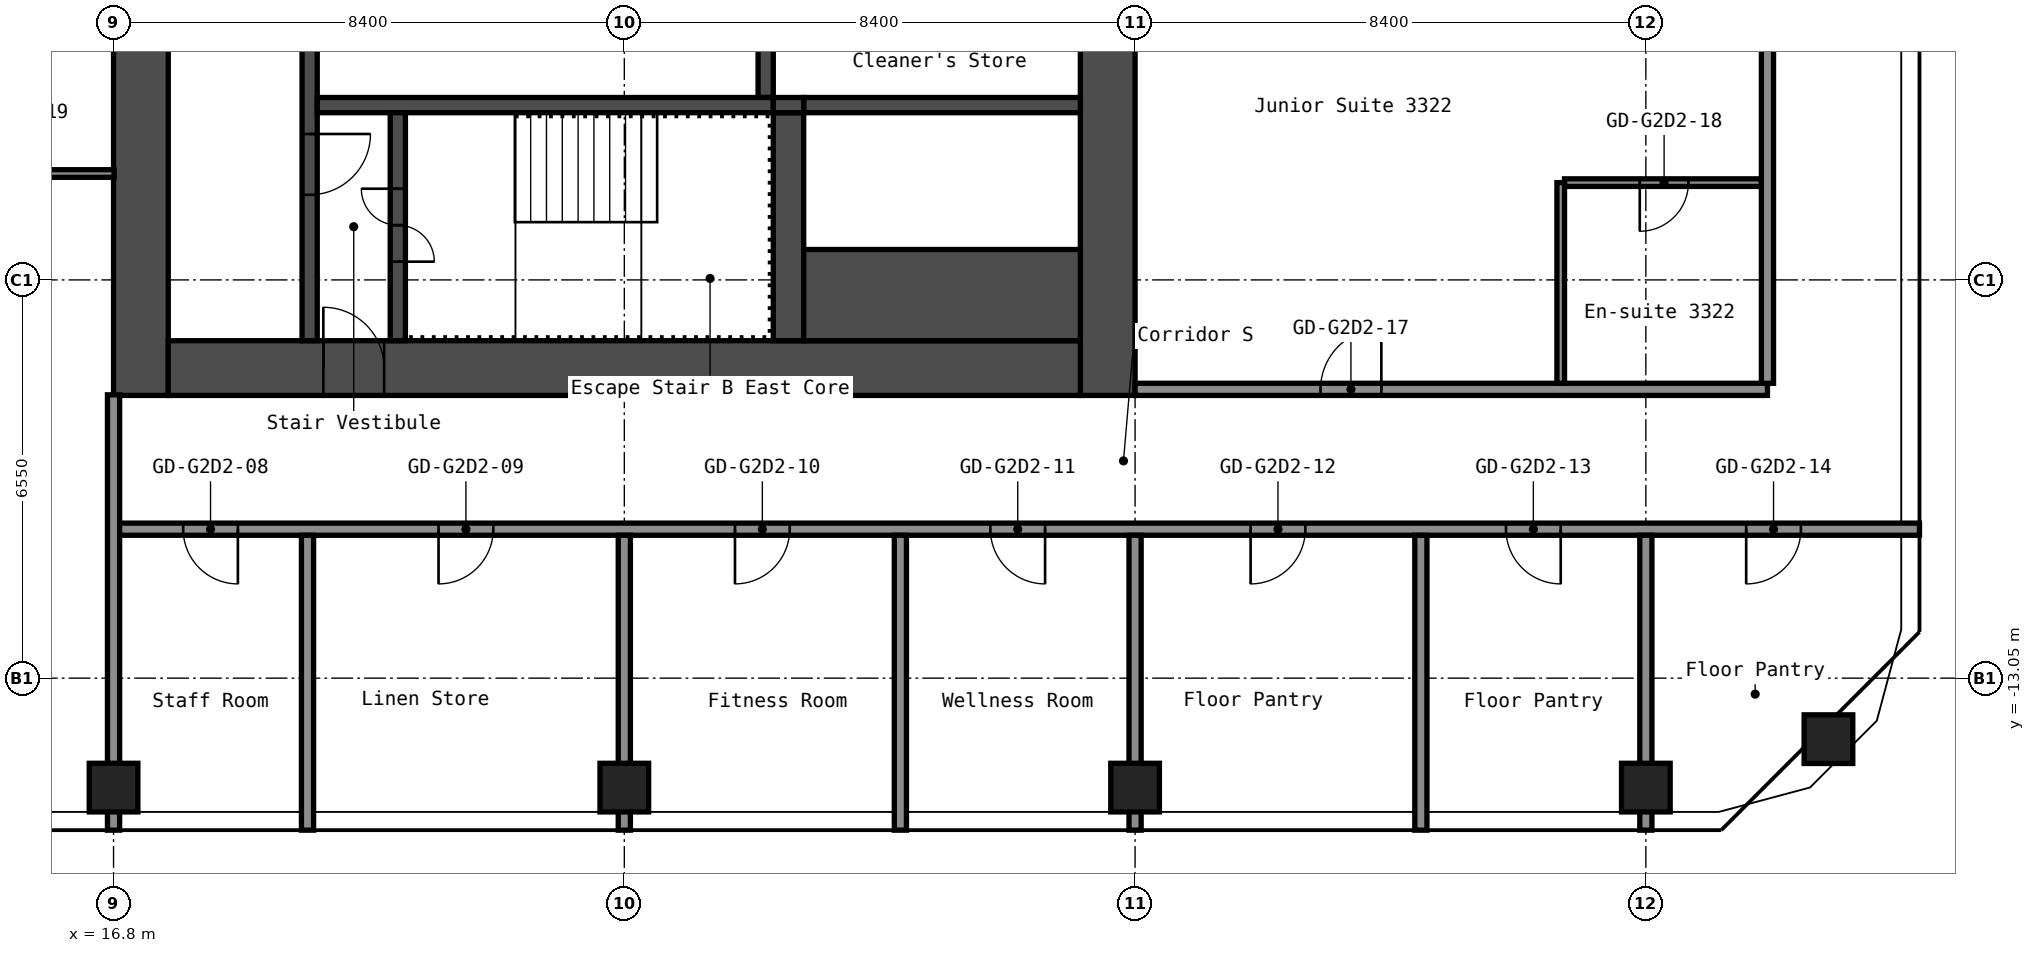
"""IFC4 building model, lengths in metres.
Left out: names, types, materials, properties, quantities, classifications, styles, units other than length and angle.
Written with IfcOpenShell. Run it as: python <this file> out.ifc"""

import sys

from ifc_helpers import new_model, si_unit, direction, frame, frame_2d, origin, origin_2d, place, context, subcontext, project, spatial, rectangle, hollow_rectangle, extrude, element, fill, save


model = new_model("IFC4")
c1 = context("Model", 3, precision=1e-05, world=origin(), true_north=direction((0.0, 1.0)))
c2 = subcontext(c1, "Body", "Model", "MODEL_VIEW")
j1 = project(units=[si_unit("LENGTHUNIT", "METRE"), si_unit("PLANEANGLEUNIT", "RADIAN")], contexts=[c1])
p1 = place(None, origin())
s1 = spatial("IfcSite", under=j1, at=p1, CompositionType="ELEMENT")
p2 = place(p1, origin())
s2 = spatial("IfcBuilding", under=s1, at=p2, CompositionType="ELEMENT")
p3 = place(p2, frame((0.0, 0.0, 117.0)))
s3 = spatial("IfcBuildingStorey", under=s2, at=p3, CompositionType="ELEMENT", Elevation=117.0)
for number, where, z_axis, x_axis in (
    (1, (16.8, -14.85, 0.0), (0.0, 0.0, 1.0), (1.0, 0.0, 0.0)),
    (2, (25.2, -14.85, 0.0), (0.0, 0.0, 1.0), (1.0, 0.0, 0.0)),
    (3, (33.6, -14.85, 0.0), (0.0, 0.0, 1.0), (1.0, 0.0, 0.0)),
    (4, (42.0, -14.85, 0.0), (0.0, 0.0, 1.0), (1.0, 0.0, 0.0)),
    (5, (45.003, -14.053, 0.0), (0.0, 0.0, 1.0), (1.0, 0.0, 0.0)),
):
    element("IfcColumn", number, at=place(p3, frame(where, z_axis=z_axis, x_axis=x_axis)), inside=s3, PredefinedType="COLUMN", context=c2, shape_type="SweptSolid", body=[
        extrude(hollow_rectangle(XDim=0.8, YDim=0.8, WallThickness=0.032, at=origin_2d()), origin(), (0.0, 0.0, 1.0), 2.9),
    ])
p4 = place(p3, frame((17.25, -8.4, 0.0), z_axis=(0.0, 0.0, 1.0), x_axis=(0.0, 1.0, 0.0)))
e6 = element("IfcWall", 6, at=p4, inside=s3, PredefinedType="SHEAR", context=c2, shape_type="SweptSolid", body=[
    extrude(rectangle(XDim=16.8, YDim=0.9, at=frame_2d((8.4, 0.0))), origin(), (0.0, 0.0, 1.0), 2.9),
])
p5 = place(p4, frame((7.6, 0.0, 0.0)))
e7 = element("IfcOpeningElement", 7, at=p5, cuts=e6, PredefinedType="OPENING", context=c2, shape_type="SweptSolid", body=[
    extrude(rectangle(XDim=1.2, YDim=2.1, at=frame_2d((0.6, 1.05))), frame((0.0, 0.46, 0.0), z_axis=(0.0, -1.0, 0.0), x_axis=(1.0, 0.0, 0.0)), (0.0, 0.0, 1.0), 0.92),
])
p6 = place(p3, frame((33.15, -8.4, 0.0), z_axis=(0.0, 0.0, 1.0), x_axis=(0.0, 1.0, 0.0)))
e8 = element("IfcWall", 8, at=p6, inside=s3, PredefinedType="SHEAR", context=c2, shape_type="SweptSolid", body=[
    extrude(rectangle(XDim=16.8, YDim=0.9, at=frame_2d((8.4, 0.0))), origin(), (0.0, 0.0, 1.0), 2.9),
])
p7 = place(p3, frame((17.7, -7.95, 0.0), z_axis=(0.0, 0.0, 1.0), x_axis=(1.0, 0.0, 0.0)))
e9 = element("IfcWall", 9, at=p7, inside=s3, PredefinedType="SHEAR", context=c2, shape_type="SweptSolid", body=[
    extrude(rectangle(XDim=15.0, YDim=0.9, at=frame_2d((7.5, 0.0))), origin(), (0.0, 0.0, 1.0), 2.9),
])
p8 = place(p7, frame((2.55, 0.0, 0.0)))
e10 = element("IfcOpeningElement", 10, at=p8, cuts=e9, PredefinedType="OPENING", context=c2, shape_type="SweptSolid", body=[
    extrude(rectangle(XDim=1.0, YDim=2.1, at=frame_2d((0.5, 1.05))), frame((0.0, 0.46, 0.0), z_axis=(0.0, -1.0, 0.0), x_axis=(1.0, 0.0, 0.0)), (0.0, 0.0, 1.0), 0.92),
])
p9 = place(p3, frame((20.025, -7.5, 0.0), z_axis=(0.0, 0.0, 1.0), x_axis=(0.0, 1.0, 0.0)))
e11 = element("IfcWall", 11, at=p9, inside=s3, PredefinedType="SHEAR", context=c2, shape_type="SweptSolid", body=[
    extrude(rectangle(XDim=6.3, YDim=0.25, at=frame_2d((3.15, 0.0))), origin(), (0.0, 0.0, 1.0), 2.9),
])
p10 = place(p9, frame((2.4, 0.0, 0.0)))
e12 = element("IfcOpeningElement", 12, at=p10, cuts=e11, PredefinedType="OPENING", context=c2, shape_type="SweptSolid", body=[
    extrude(rectangle(XDim=1.0, YDim=2.1, at=frame_2d((0.5, 1.05))), frame((0.0, 0.135, 0.0), z_axis=(0.0, -1.0, 0.0), x_axis=(1.0, 0.0, 0.0)), (0.0, 0.0, 1.0), 0.27),
])
p11 = place(p3, frame((27.525, -3.5, 0.0), z_axis=(0.0, 0.0, 1.0), x_axis=(0.0, 1.0, 0.0)))
e13 = element("IfcWall", 13, at=p11, inside=s3, PredefinedType="SHEAR", context=c2, shape_type="SweptSolid", body=[
    extrude(rectangle(XDim=2.05, YDim=0.25, at=frame_2d((1.025, 0.0))), origin(), (0.0, 0.0, 1.0), 2.9),
])
p12 = place(p3, frame((20.15, -3.625, 0.0), z_axis=(0.0, 0.0, 1.0), x_axis=(1.0, 0.0, 0.0)))
e14 = element("IfcWall", 14, at=p12, inside=s3, PredefinedType="SHEAR", context=c2, shape_type="SweptSolid", body=[
    extrude(rectangle(XDim=7.5, YDim=0.25, at=frame_2d((3.75, 0.0))), origin(), (0.0, 0.0, 1.0), 2.9),
])
p13 = place(p3, frame((21.475, -7.5, 0.0), z_axis=(0.0, 0.0, 1.0), x_axis=(0.0, 1.0, 0.0)))
e15 = element("IfcWall", 15, at=p13, inside=s3, PredefinedType="SHEAR", context=c2, shape_type="SweptSolid", body=[
    extrude(rectangle(XDim=3.75, YDim=0.25, at=frame_2d((1.875, 0.0))), origin(), (0.0, 0.0, 1.0), 2.9),
])
p14 = place(p13, frame((1.3, 0.0, 0.0)))
e16 = element("IfcOpeningElement", 16, at=p14, cuts=e15, PredefinedType="OPENING", context=c2, shape_type="SweptSolid", body=[
    extrude(rectangle(XDim=1.2, YDim=2.1, at=frame_2d((0.6, 1.05))), frame((0.0, 0.135, 0.0), z_axis=(0.0, -1.0, 0.0), x_axis=(1.0, 0.0, 0.0)), (0.0, 0.0, 1.0), 0.27),
])
p15 = place(p3, frame((27.9, -7.5, 0.0), z_axis=(0.0, 0.0, 1.0), x_axis=(0.0, 1.0, 0.0)))
e17 = element("IfcWall", 17, at=p15, inside=s3, PredefinedType="SHEAR", context=c2, shape_type="SweptSolid", body=[
    extrude(rectangle(XDim=3.75, YDim=0.5, at=frame_2d((1.875, 0.0))), origin(), (0.0, 0.0, 1.0), 2.9),
])
p16 = place(p3, frame((28.15, -3.625, 0.0), z_axis=(0.0, 0.0, 1.0), x_axis=(1.0, 0.0, 0.0)))
e18 = element("IfcWall", 18, at=p16, inside=s3, PredefinedType="SHEAR", context=c2, shape_type="SweptSolid", body=[
    extrude(rectangle(XDim=4.55, YDim=0.25, at=frame_2d((2.275, 0.0))), origin(), (0.0, 0.0, 1.0), 2.9),
])
p17 = place(p3, frame((28.15, -6.75, 0.0), z_axis=(0.0, 0.0, 1.0), x_axis=(1.0, 0.0, 0.0)))
e19 = element("IfcWall", 19, at=p17, inside=s3, PredefinedType="SHEAR", context=c2, shape_type="SweptSolid", body=[
    extrude(rectangle(XDim=4.55, YDim=1.5, at=frame_2d((2.275, 0.0))), origin(), (0.0, 0.0, 1.0), 2.9),
])
p18 = place(p3, frame((27.65, -3.625, 0.0), z_axis=(0.0, 0.0, 1.0), x_axis=(1.0, 0.0, 0.0)))
e20 = element("IfcWall", 20, at=p18, inside=s3, PredefinedType="SHEAR", context=c2, shape_type="SweptSolid", body=[
    extrude(rectangle(XDim=0.5, YDim=0.25, at=frame_2d((0.25, 0.0))), origin(), (0.0, 0.0, 1.0), 2.9),
])
p19 = place(p3, frame((16.8, -10.6, 0.0), z_axis=(0.0, 0.0, 1.0), x_axis=(1.0, 0.0, 0.0)))
e21 = element("IfcWall", 21, at=p19, inside=s3, PredefinedType="PARTITIONING", context=c2, shape_type="SweptSolid", body=[
    extrude(rectangle(XDim=29.7, YDim=0.2, at=frame_2d((14.85, 0.0))), origin(), (0.0, 0.0, 1.0), 2.9),
])
p20 = place(p19, frame((1.145, 0.0, 0.0)))
e22 = element("IfcOpeningElement", 22, at=p20, cuts=e21, PredefinedType="OPENING", context=c2, shape_type="SweptSolid", body=[
    extrude(rectangle(XDim=0.9, YDim=2.1, at=frame_2d((0.45, 1.05))), frame((0.0, 0.11, 0.0), z_axis=(0.0, -1.0, 0.0), x_axis=(1.0, 0.0, 0.0)), (0.0, 0.0, 1.0), 0.22),
])
p21 = place(p19, frame((5.345, 0.0, 0.0)))
e23 = element("IfcOpeningElement", 23, at=p21, cuts=e21, PredefinedType="OPENING", context=c2, shape_type="SweptSolid", body=[
    extrude(rectangle(XDim=0.9, YDim=2.1, at=frame_2d((0.45, 1.05))), frame((0.0, 0.11, 0.0), z_axis=(0.0, -1.0, 0.0), x_axis=(1.0, 0.0, 0.0)), (0.0, 0.0, 1.0), 0.22),
])
p22 = place(p19, frame((10.22, 0.0, 0.0)))
e24 = element("IfcOpeningElement", 24, at=p22, cuts=e21, PredefinedType="OPENING", context=c2, shape_type="SweptSolid", body=[
    extrude(rectangle(XDim=0.9, YDim=2.1, at=frame_2d((0.45, 1.05))), frame((0.0, 0.11, 0.0), z_axis=(0.0, -1.0, 0.0), x_axis=(1.0, 0.0, 0.0)), (0.0, 0.0, 1.0), 0.22),
])
p23 = place(p19, frame((14.42, 0.0, 0.0)))
e25 = element("IfcOpeningElement", 25, at=p23, cuts=e21, PredefinedType="OPENING", context=c2, shape_type="SweptSolid", body=[
    extrude(rectangle(XDim=0.9, YDim=2.1, at=frame_2d((0.45, 1.05))), frame((0.0, 0.11, 0.0), z_axis=(0.0, -1.0, 0.0), x_axis=(1.0, 0.0, 0.0)), (0.0, 0.0, 1.0), 0.22),
])
p24 = place(p19, frame((18.7, 0.0, 0.0)))
e26 = element("IfcOpeningElement", 26, at=p24, cuts=e21, PredefinedType="OPENING", context=c2, shape_type="SweptSolid", body=[
    extrude(rectangle(XDim=0.9, YDim=2.1, at=frame_2d((0.45, 1.05))), frame((0.0, 0.11, 0.0), z_axis=(0.0, -1.0, 0.0), x_axis=(1.0, 0.0, 0.0)), (0.0, 0.0, 1.0), 0.22),
])
p25 = place(p19, frame((22.9, 0.0, 0.0)))
e27 = element("IfcOpeningElement", 27, at=p25, cuts=e21, PredefinedType="OPENING", context=c2, shape_type="SweptSolid", body=[
    extrude(rectangle(XDim=0.9, YDim=2.1, at=frame_2d((0.45, 1.05))), frame((0.0, 0.11, 0.0), z_axis=(0.0, -1.0, 0.0), x_axis=(1.0, 0.0, 0.0)), (0.0, 0.0, 1.0), 0.22),
])
p26 = place(p19, frame((26.85, 0.0, 0.0)))
e28 = element("IfcOpeningElement", 28, at=p26, cuts=e21, PredefinedType="OPENING", context=c2, shape_type="SweptSolid", body=[
    extrude(rectangle(XDim=0.9, YDim=2.1, at=frame_2d((0.45, 1.05))), frame((0.0, 0.11, 0.0), z_axis=(0.0, -1.0, 0.0), x_axis=(1.0, 0.0, 0.0)), (0.0, 0.0, 1.0), 0.22),
])
p27 = place(p3, frame((33.6, -8.3, 0.0), z_axis=(0.0, 0.0, 1.0), x_axis=(1.0, 0.0, 0.0)))
e29 = element("IfcWall", 29, at=p27, inside=s3, PredefinedType="PARTITIONING", context=c2, shape_type="SweptSolid", body=[
    extrude(rectangle(XDim=10.4, YDim=0.2, at=frame_2d((5.2, 0.0))), origin(), (0.0, 0.0, 1.0), 2.9),
])
p28 = place(p27, frame((3.05, 0.0, 0.0)))
e30 = element("IfcOpeningElement", 30, at=p28, cuts=e29, PredefinedType="OPENING", context=c2, shape_type="SweptSolid", body=[
    extrude(rectangle(XDim=1.0, YDim=2.1, at=frame_2d((0.5, 1.05))), frame((0.0, 0.11, 0.0), z_axis=(0.0, -1.0, 0.0), x_axis=(1.0, 0.0, 0.0)), (0.0, 0.0, 1.0), 0.22),
])
p29 = place(p3, frame((40.663, -4.9, 0.0), z_axis=(0.0, 0.0, 1.0), x_axis=(1.0, 0.0, 0.0)))
e31 = element("IfcWall", 31, at=p29, inside=s3, PredefinedType="PARTITIONING", context=c2, shape_type="SweptSolid", body=[
    extrude(rectangle(XDim=3.237, YDim=0.125, at=frame_2d((1.619, 0.0))), origin(), (0.0, 0.0, 1.0), 2.9),
])
p30 = place(p29, frame((1.238, 0.0, 0.0)))
e32 = element("IfcOpeningElement", 32, at=p30, cuts=e31, PredefinedType="OPENING", context=c2, shape_type="SweptSolid", body=[
    extrude(rectangle(XDim=0.8, YDim=2.1, at=frame_2d((0.4, 1.05))), frame((0.0, 0.073, 0.0), z_axis=(0.0, -1.0, 0.0), x_axis=(1.0, 0.0, 0.0)), (0.0, 0.0, 1.0), 0.145),
])
p31 = place(p3, frame((13.462, -4.75, 0.0), z_axis=(0.0, 0.0, 1.0), x_axis=(1.0, 0.0, 0.0)))
e33 = element("IfcWall", 33, at=p31, inside=s3, PredefinedType="PARTITIONING", context=c2, shape_type="SweptSolid", body=[
    extrude(rectangle(XDim=3.348, YDim=0.125, at=frame_2d((1.674, 0.0))), origin(), (0.0, 0.0, 1.0), 2.9),
])
p32 = place(p31, frame((1.238, 0.0, 0.0)))
e34 = element("IfcOpeningElement", 34, at=p32, cuts=e33, PredefinedType="OPENING", context=c2, shape_type="SweptSolid", body=[
    extrude(rectangle(XDim=0.8, YDim=2.1, at=frame_2d((0.4, 1.05))), frame((0.0, 0.073, 0.0), z_axis=(0.0, -1.0, 0.0), x_axis=(1.0, 0.0, 0.0)), (0.0, 0.0, 1.0), 0.145),
])
p33 = place(p3, frame((16.8, -15.55, 0.0), z_axis=(0.0, 0.0, 1.0), x_axis=(0.0, 1.0, 0.0)))
e35 = element("IfcWall", 35, at=p33, inside=s3, PredefinedType="PARTITIONING", context=c2, shape_type="SweptSolid", body=[
    extrude(rectangle(XDim=7.16, YDim=0.2, at=frame_2d((3.58, 0.0))), origin(), (0.0, 0.0, 1.0), 2.9),
])
for number, where, z_axis, x_axis in (
    (36, (19.99, -15.55, 0.0), (0.0, 0.0, 1.0), (0.0, 1.0, 0.0)),
    (37, (25.2, -15.55, 0.0), (0.0, 0.0, 1.0), (0.0, 1.0, 0.0)),
    (38, (29.74, -15.55, 0.0), (0.0, 0.0, 1.0), (0.0, 1.0, 0.0)),
    (39, (33.6, -15.55, 0.0), (0.0, 0.0, 1.0), (0.0, 1.0, 0.0)),
    (40, (38.3, -15.55, 0.0), (0.0, 0.0, 1.0), (0.0, 1.0, 0.0)),
):
    element("IfcWall", number, at=place(p3, frame(where, z_axis=z_axis, x_axis=x_axis)), inside=s3, PredefinedType="PARTITIONING", context=c2, shape_type="SweptSolid", body=[
        extrude(rectangle(XDim=4.85, YDim=0.2, at=frame_2d((2.425, 0.0))), origin(), (0.0, 0.0, 1.0), 2.9),
    ])
p34 = place(p3, frame((40.6, -8.2, 0.0), z_axis=(0.0, 0.0, 1.0), x_axis=(0.0, 1.0, 0.0)))
e41 = element("IfcWall", 41, at=p34, inside=s3, PredefinedType="PARTITIONING", context=c2, shape_type="SweptSolid", body=[
    extrude(rectangle(XDim=3.3, YDim=0.125, at=frame_2d((1.65, 0.0))), origin(), (0.0, 0.0, 1.0), 2.9),
])
p35 = place(p3, frame((42.0, -15.55, 0.0), z_axis=(0.0, 0.0, 1.0), x_axis=(0.0, 1.0, 0.0)))
e42 = element("IfcWall", 42, at=p35, inside=s3, PredefinedType="PARTITIONING", context=c2, shape_type="SweptSolid", body=[
    extrude(rectangle(XDim=4.85, YDim=0.2, at=frame_2d((2.425, 0.0))), origin(), (0.0, 0.0, 1.0), 2.9),
])
p36 = place(p3, frame((44.0, -8.2, 0.0), z_axis=(0.0, 0.0, 1.0), x_axis=(0.0, 1.0, 0.0)))
e43 = element("IfcWall", 43, at=p36, inside=s3, PredefinedType="PARTITIONING", context=c2, shape_type="SweptSolid", body=[
    extrude(rectangle(XDim=16.4, YDim=0.2, at=frame_2d((8.2, 0.0))), origin(), (0.0, 0.0, 1.0), 2.9),
])
p37 = place(p8, origin())
e44 = element("IfcDoor", 44, at=p37, inside=s3, OperationType="SINGLE_SWING_RIGHT", PredefinedType="DOOR", context=c2, shape_type="SweptSolid", body=[
    extrude(rectangle(XDim=1.0, YDim=2.1, at=frame_2d((0.5, 1.05))), frame((0.0, 0.025, 0.0), z_axis=(0.0, -1.0, 0.0), x_axis=(1.0, 0.0, 0.0)), (0.0, 0.0, 1.0), 0.05),
])
fill(e10, e44)
p38 = place(p14, origin())
e45 = element("IfcDoor", 45, at=p38, inside=s3, OperationType="DOUBLE_DOOR_SINGLE_SWING", PredefinedType="DOOR", context=c2, shape_type="SweptSolid", body=[
    extrude(rectangle(XDim=1.2, YDim=2.1, at=frame_2d((0.6, 1.05))), frame((0.0, 0.025, 0.0), z_axis=(0.0, -1.0, 0.0), x_axis=(1.0, 0.0, 0.0)), (0.0, 0.0, 1.0), 0.05),
])
fill(e16, e45)
p39 = place(p10, origin())
e46 = element("IfcDoor", 46, at=p39, inside=s3, OperationType="SINGLE_SWING_RIGHT", PredefinedType="DOOR", context=c2, shape_type="SweptSolid", body=[
    extrude(rectangle(XDim=1.0, YDim=2.1, at=frame_2d((0.5, 1.05))), frame((0.0, 0.025, 0.0), z_axis=(0.0, -1.0, 0.0), x_axis=(1.0, 0.0, 0.0)), (0.0, 0.0, 1.0), 0.05),
])
fill(e12, e46)
p40 = place(p20, origin())
e47 = element("IfcDoor", 47, at=p40, inside=s3, OperationType="SINGLE_SWING_RIGHT", PredefinedType="DOOR", context=c2, shape_type="SweptSolid", body=[
    extrude(rectangle(XDim=0.9, YDim=2.1, at=frame_2d((0.45, 1.05))), frame((0.0, 0.025, 0.0), z_axis=(0.0, -1.0, 0.0), x_axis=(1.0, 0.0, 0.0)), (0.0, 0.0, 1.0), 0.05),
])
fill(e22, e47)
p41 = place(p21, origin())
e48 = element("IfcDoor", 48, at=p41, inside=s3, OperationType="SINGLE_SWING_LEFT", PredefinedType="DOOR", context=c2, shape_type="SweptSolid", body=[
    extrude(rectangle(XDim=0.9, YDim=2.1, at=frame_2d((0.45, 1.05))), frame((0.0, 0.025, 0.0), z_axis=(0.0, -1.0, 0.0), x_axis=(1.0, 0.0, 0.0)), (0.0, 0.0, 1.0), 0.05),
])
fill(e23, e48)
p42 = place(p22, origin())
e49 = element("IfcDoor", 49, at=p42, inside=s3, OperationType="SINGLE_SWING_LEFT", PredefinedType="DOOR", context=c2, shape_type="SweptSolid", body=[
    extrude(rectangle(XDim=0.9, YDim=2.1, at=frame_2d((0.45, 1.05))), frame((0.0, 0.025, 0.0), z_axis=(0.0, -1.0, 0.0), x_axis=(1.0, 0.0, 0.0)), (0.0, 0.0, 1.0), 0.05),
])
fill(e24, e49)
p43 = place(p23, origin())
e50 = element("IfcDoor", 50, at=p43, inside=s3, OperationType="SINGLE_SWING_RIGHT", PredefinedType="DOOR", context=c2, shape_type="SweptSolid", body=[
    extrude(rectangle(XDim=0.9, YDim=2.1, at=frame_2d((0.45, 1.05))), frame((0.0, 0.025, 0.0), z_axis=(0.0, -1.0, 0.0), x_axis=(1.0, 0.0, 0.0)), (0.0, 0.0, 1.0), 0.05),
])
fill(e25, e50)
p44 = place(p24, origin())
e51 = element("IfcDoor", 51, at=p44, inside=s3, OperationType="SINGLE_SWING_LEFT", PredefinedType="DOOR", context=c2, shape_type="SweptSolid", body=[
    extrude(rectangle(XDim=0.9, YDim=2.1, at=frame_2d((0.45, 1.05))), frame((0.0, 0.025, 0.0), z_axis=(0.0, -1.0, 0.0), x_axis=(1.0, 0.0, 0.0)), (0.0, 0.0, 1.0), 0.05),
])
fill(e26, e51)
p45 = place(p25, origin())
e52 = element("IfcDoor", 52, at=p45, inside=s3, OperationType="SINGLE_SWING_RIGHT", PredefinedType="DOOR", context=c2, shape_type="SweptSolid", body=[
    extrude(rectangle(XDim=0.9, YDim=2.1, at=frame_2d((0.45, 1.05))), frame((0.0, 0.025, 0.0), z_axis=(0.0, -1.0, 0.0), x_axis=(1.0, 0.0, 0.0)), (0.0, 0.0, 1.0), 0.05),
])
fill(e27, e52)
p46 = place(p26, origin())
e53 = element("IfcDoor", 53, at=p46, inside=s3, OperationType="SINGLE_SWING_LEFT", PredefinedType="DOOR", context=c2, shape_type="SweptSolid", body=[
    extrude(rectangle(XDim=0.9, YDim=2.1, at=frame_2d((0.45, 1.05))), frame((0.0, 0.025, 0.0), z_axis=(0.0, -1.0, 0.0), x_axis=(1.0, 0.0, 0.0)), (0.0, 0.0, 1.0), 0.05),
])
fill(e28, e53)
p47 = place(p28, origin())
e54 = element("IfcDoor", 54, at=p47, inside=s3, OperationType="SINGLE_SWING_LEFT", PredefinedType="DOOR", context=c2, shape_type="SweptSolid", body=[
    extrude(rectangle(XDim=1.0, YDim=2.1, at=frame_2d((0.5, 1.05))), frame((0.0, 0.025, 0.0), z_axis=(0.0, -1.0, 0.0), x_axis=(1.0, 0.0, 0.0)), (0.0, 0.0, 1.0), 0.05),
])
fill(e30, e54)
p48 = place(p30, origin())
e55 = element("IfcDoor", 55, at=p48, inside=s3, OperationType="SINGLE_SWING_LEFT", PredefinedType="DOOR", context=c2, shape_type="SweptSolid", body=[
    extrude(rectangle(XDim=0.8, YDim=2.1, at=frame_2d((0.4, 1.05))), frame((0.0, 0.025, 0.0), z_axis=(0.0, -1.0, 0.0), x_axis=(1.0, 0.0, 0.0)), (0.0, 0.0, 1.0), 0.05),
])
fill(e32, e55)
save(model, sys.argv[1])
